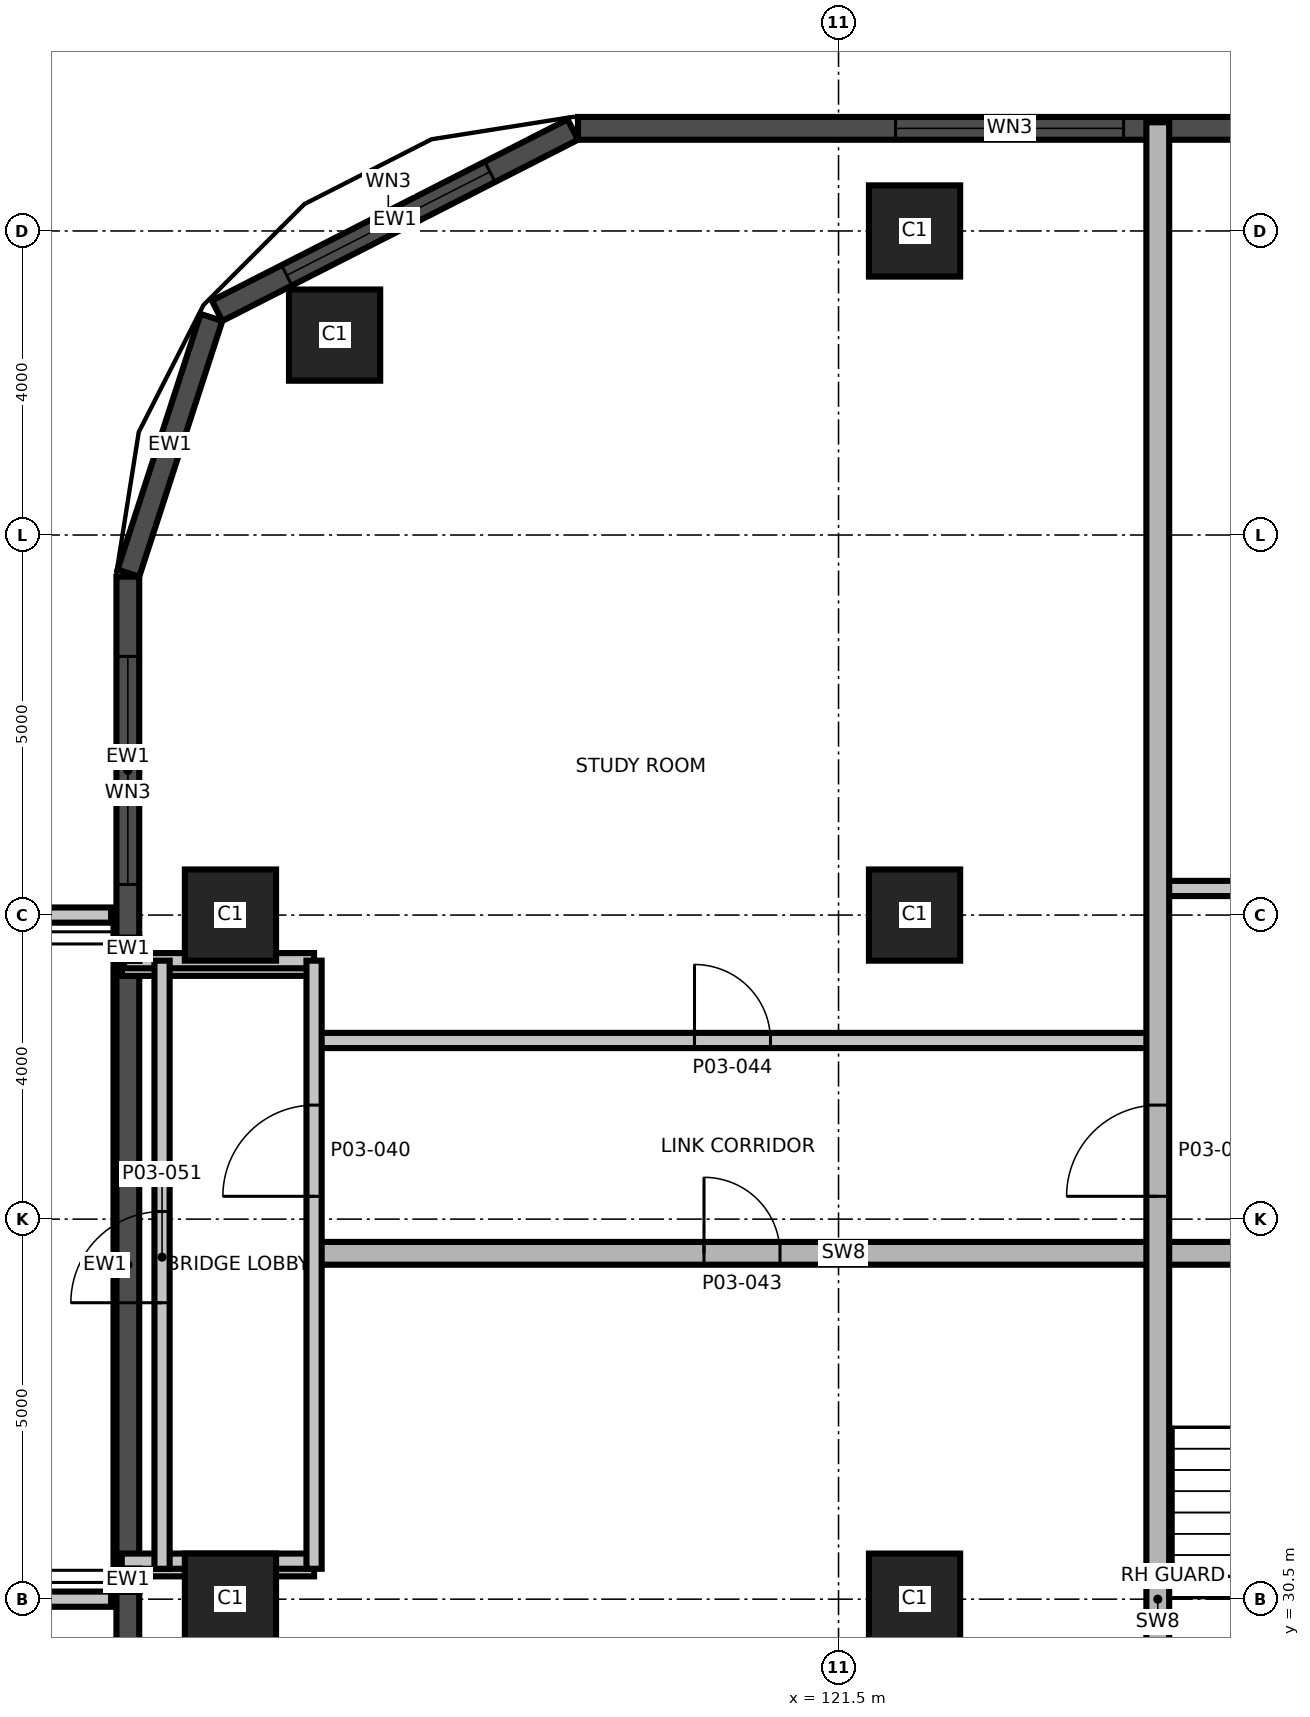
"""IFC4 building model, lengths in metres.
Left out: names, types, materials, properties, quantities, classifications, styles, units other than length and angle.
Written with IfcOpenShell. Run it as: python <this file> out.ifc"""

import sys

from ifc_helpers import new_model, si_unit, direction, frame, frame_2d, origin, origin_2d, place, context, subcontext, project, spatial, rectangle, extrude, element, fill, save


model = new_model("IFC4")
c1 = context("Model", 3, precision=1e-05, world=origin(), true_north=direction((0.0, 1.0)))
c2 = subcontext(c1, "Body", "Model", "MODEL_VIEW")
j1 = project(units=[si_unit("LENGTHUNIT", "METRE"), si_unit("PLANEANGLEUNIT", "RADIAN")], contexts=[c1])
p1 = place(None, origin())
s1 = spatial("IfcSite", under=j1, at=p1, CompositionType="ELEMENT")
p2 = place(p1, origin())
s2 = spatial("IfcBuilding", under=s1, at=p2, CompositionType="ELEMENT")
p3 = place(p2, frame((0.0, 0.0, 18.5)))
s3 = spatial("IfcBuildingStorey", under=s2, at=p3, CompositionType="ELEMENT", Elevation=18.5)
for number, where, z_axis, x_axis in (
    (1, (113.5, 30.5, 0.0), (0.0, 0.0, 1.0), (1.0, 0.0, 0.0)),
    (2, (122.5, 30.5, 0.0), (0.0, 0.0, 1.0), (1.0, 0.0, 0.0)),
    (3, (113.5, 39.5, 0.0), (0.0, 0.0, 1.0), (1.0, 0.0, 0.0)),
    (4, (122.5, 39.5, 0.0), (0.0, 0.0, 1.0), (1.0, 0.0, 0.0)),
    (5, (114.87, 47.13, 0.0), (0.0, 0.0, 1.0), (1.0, 0.0, 0.0)),
    (6, (122.5, 48.5, 0.0), (0.0, 0.0, 1.0), (1.0, 0.0, 0.0)),
):
    element("IfcColumn", number, at=place(p3, frame(where, z_axis=z_axis, x_axis=x_axis)), inside=s3, PredefinedType="COLUMN", context=c2, shape_type="SweptSolid", body=[
        extrude(rectangle(XDim=1.2, YDim=1.2, at=origin_2d()), origin(), (0.0, 0.0, 1.0), 5.0),
    ])
p4 = place(p3, frame((153.952, 49.85, 0.0), z_axis=(0.0, 0.0, 1.0), x_axis=(-1.0, 0.0, 0.0)))
e7 = element("IfcWall", 7, at=p4, inside=s3, PredefinedType="SOLIDWALL", context=c2, shape_type="SweptSolid", body=[
    extrude(rectangle(XDim=35.88, YDim=0.3, at=frame_2d((17.94, 0.0))), origin(), (0.0, 0.0, 1.0), 4.7),
])
p5 = place(p4, frame((1.226, 0.0, 0.9)))
e8 = element("IfcOpeningElement", 8, at=p5, cuts=e7, PredefinedType="OPENING", context=c2, shape_type="SweptSolid", body=[
    extrude(rectangle(XDim=3.0, YDim=2.4, at=frame_2d((1.5, 1.2))), frame((0.0, 0.16, 0.0), z_axis=(0.0, -1.0, 0.0), x_axis=(1.0, 0.0, 0.0)), (0.0, 0.0, 1.0), 0.32),
])
p6 = place(p4, frame((15.202, 0.0, 0.9)))
e9 = element("IfcOpeningElement", 9, at=p6, cuts=e7, PredefinedType="OPENING", context=c2, shape_type="SweptSolid", body=[
    extrude(rectangle(XDim=3.0, YDim=2.4, at=frame_2d((1.5, 1.2))), frame((0.0, 0.16, 0.0), z_axis=(0.0, -1.0, 0.0), x_axis=(1.0, 0.0, 0.0)), (0.0, 0.0, 1.0), 0.32),
])
p7 = place(p4, frame((24.202, 0.0, 0.9)))
e10 = element("IfcOpeningElement", 10, at=p7, cuts=e7, PredefinedType="OPENING", context=c2, shape_type="SweptSolid", body=[
    extrude(rectangle(XDim=3.0, YDim=2.4, at=frame_2d((1.5, 1.2))), frame((0.0, 0.16, 0.0), z_axis=(0.0, -1.0, 0.0), x_axis=(1.0, 0.0, 0.0)), (0.0, 0.0, 1.0), 0.32),
])
p8 = place(p4, frame((28.702, 0.0, 0.9)))
e11 = element("IfcOpeningElement", 11, at=p8, cuts=e7, PredefinedType="OPENING", context=c2, shape_type="SweptSolid", body=[
    extrude(rectangle(XDim=3.0, YDim=2.4, at=frame_2d((1.5, 1.2))), frame((0.0, 0.16, 0.0), z_axis=(0.0, -1.0, 0.0), x_axis=(1.0, 0.0, 0.0)), (0.0, 0.0, 1.0), 0.32),
])
p9 = place(p3, frame((118.004, 49.834, 0.0), z_axis=(0.0, 0.0, 1.0), x_axis=(-0.890998339455, -0.454006562826, 0.0)))
e12 = element("IfcWall", 12, at=p9, inside=s3, PredefinedType="SOLIDWALL", context=c2, shape_type="SweptSolid", body=[
    extrude(rectangle(XDim=5.252, YDim=0.3, at=frame_2d((2.626, 0.0))), origin(), (0.0, 0.0, 1.0), 4.7),
])
p10 = place(p9, frame((1.224, 0.0, 0.9)))
e13 = element("IfcOpeningElement", 13, at=p10, cuts=e12, PredefinedType="OPENING", context=c2, shape_type="SweptSolid", body=[
    extrude(rectangle(XDim=3.0, YDim=2.4, at=frame_2d((1.5, 1.2))), frame((0.0, 0.16, 0.0), z_axis=(0.0, -1.0, 0.0), x_axis=(1.0, 0.0, 0.0)), (0.0, 0.0, 1.0), 0.32),
])
p11 = place(p3, frame((113.25, 47.362, 0.0), z_axis=(0.0, 0.0, 1.0), x_axis=(-0.309073584194, -0.951038127287, 0.0)))
e14 = element("IfcWall", 14, at=p11, inside=s3, PredefinedType="SOLIDWALL", context=c2, shape_type="SweptSolid", body=[
    extrude(rectangle(XDim=3.536, YDim=0.3, at=frame_2d((1.768, 0.0))), origin(), (0.0, 0.0, 1.0), 4.7),
])
p12 = place(p3, frame((112.15, 38.9, 3.15), z_axis=(0.0, 0.0, 1.0), x_axis=(0.0, -1.0, 0.0)))
e15 = element("IfcWall", 15, at=p12, inside=s3, PredefinedType="SOLIDWALL", context=c2, shape_type="SweptSolid", body=[
    extrude(rectangle(XDim=8.0, YDim=0.3, at=frame_2d((4.0, 0.0))), origin(), (0.0, 0.0, 1.0), 1.55),
])
p13 = place(p3, frame((112.15, 43.952, 0.0), z_axis=(0.0, 0.0, 1.0), x_axis=(0.0, -1.0, 0.0)))
e16 = element("IfcWall", 16, at=p13, inside=s3, PredefinedType="SOLIDWALL", context=c2, shape_type="SweptSolid", body=[
    extrude(rectangle(XDim=4.752, YDim=0.3, at=frame_2d((2.376, 0.0))), origin(), (0.0, 0.0, 1.0), 4.7),
])
p14 = place(p13, frame((1.05, 0.0, 0.9)))
e17 = element("IfcOpeningElement", 17, at=p14, cuts=e16, PredefinedType="OPENING", context=c2, shape_type="SweptSolid", body=[
    extrude(rectangle(XDim=3.0, YDim=2.4, at=frame_2d((1.5, 1.2))), frame((0.0, 0.16, 0.0), z_axis=(0.0, -1.0, 0.0), x_axis=(1.0, 0.0, 0.0)), (0.0, 0.0, 1.0), 0.32),
])
p15 = place(p3, frame((112.15, 30.6, 0.0), z_axis=(0.0, 0.0, 1.0), x_axis=(0.0, -1.0, 0.0)))
e18 = element("IfcWall", 18, at=p15, inside=s3, PredefinedType="SOLIDWALL", context=c2, shape_type="SweptSolid", body=[
    extrude(rectangle(XDim=13.528, YDim=0.3, at=frame_2d((6.764, 0.0))), origin(), (0.0, 0.0, 1.0), 4.7),
])
p16 = place(p15, frame((0.676, 0.0, 0.9)))
e19 = element("IfcOpeningElement", 19, at=p16, cuts=e18, PredefinedType="OPENING", context=c2, shape_type="SweptSolid", body=[
    extrude(rectangle(XDim=3.0, YDim=2.4, at=frame_2d((1.5, 1.2))), frame((0.0, 0.16, 0.0), z_axis=(0.0, -1.0, 0.0), x_axis=(1.0, 0.0, 0.0)), (0.0, 0.0, 1.0), 0.32),
])
p17 = place(p15, frame((5.376, 0.0, 0.9)))
e20 = element("IfcOpeningElement", 20, at=p17, cuts=e18, PredefinedType="OPENING", context=c2, shape_type="SweptSolid", body=[
    extrude(rectangle(XDim=3.0, YDim=2.4, at=frame_2d((1.5, 1.2))), frame((0.0, 0.16, 0.0), z_axis=(0.0, -1.0, 0.0), x_axis=(1.0, 0.0, 0.0)), (0.0, 0.0, 1.0), 0.32),
])
p18 = place(p15, frame((9.876, 0.0, 0.9)))
e21 = element("IfcOpeningElement", 21, at=p18, cuts=e18, PredefinedType="OPENING", context=c2, shape_type="SweptSolid", body=[
    extrude(rectangle(XDim=3.0, YDim=2.4, at=frame_2d((1.5, 1.2))), frame((0.0, 0.16, 0.0), z_axis=(0.0, -1.0, 0.0), x_axis=(1.0, 0.0, 0.0)), (0.0, 0.0, 1.0), 0.32),
])
p19 = place(p3, frame((105.07, 30.5, 0.0), z_axis=(0.0, 0.0, 1.0), x_axis=(1.0, 0.0, 0.0)))
e22 = element("IfcWall", 22, at=p19, inside=s3, PredefinedType="PARTITIONING", context=c2, shape_type="SweptSolid", body=[
    extrude(rectangle(XDim=6.86, YDim=0.2, at=frame_2d((3.43, 0.0))), origin(), (0.0, 0.0, 1.0), 4.7),
])
p20 = place(p3, frame((112.1, 30.9, 0.0), z_axis=(0.0, 0.0, 1.0), x_axis=(1.0, 0.0, 0.0)))
e23 = element("IfcWall", 23, at=p20, inside=s3, PredefinedType="PARTITIONING", context=c2, shape_type="SweptSolid", body=[
    extrude(rectangle(XDim=2.5, YDim=0.2, at=frame_2d((1.25, 0.0))), origin(), (0.0, 0.0, 1.0), 2.7),
])
p21 = place(p3, frame((112.07, 31.0, 0.0), z_axis=(0.0, 0.0, 1.0), x_axis=(1.0, 0.0, 0.0)))
e24 = element("IfcWall", 24, at=p21, inside=s3, PredefinedType="PARTITIONING", context=c2, shape_type="SweptSolid", body=[
    extrude(rectangle(XDim=2.53, YDim=0.2, at=frame_2d((1.265, 0.0))), origin(), (0.0, 0.0, 1.0), 4.7),
])
p22 = place(p3, frame((114.6, 35.05, 0.0), z_axis=(0.0, 0.0, 1.0), x_axis=(1.0, 0.0, 0.0)))
e25 = element("IfcWall", 25, at=p22, inside=s3, PredefinedType="SHEAR", context=c2, shape_type="SweptSolid", body=[
    extrude(rectangle(XDim=13.93, YDim=0.3, at=frame_2d((6.965, 0.0))), origin(), (0.0, 0.0, 1.0), 4.7),
])
p23 = place(p22, frame((5.13, 0.0, 0.0)))
e26 = element("IfcOpeningElement", 26, at=p23, cuts=e25, PredefinedType="OPENING", context=c2, shape_type="SweptSolid", body=[
    extrude(rectangle(XDim=1.0, YDim=2.1, at=frame_2d((0.5, 1.05))), frame((0.0, 0.16, 0.0), z_axis=(0.0, -1.0, 0.0), x_axis=(1.0, 0.0, 0.0)), (0.0, 0.0, 1.0), 0.32),
])
p24 = place(p3, frame((114.6, 37.85, 0.0), z_axis=(0.0, 0.0, 1.0), x_axis=(1.0, 0.0, 0.0)))
e27 = element("IfcWall", 27, at=p24, inside=s3, PredefinedType="PARTITIONING", context=c2, shape_type="SweptSolid", body=[
    extrude(rectangle(XDim=11.15, YDim=0.2, at=frame_2d((5.575, 0.0))), origin(), (0.0, 0.0, 1.0), 4.7),
])
p25 = place(p24, frame((5.005, 0.0, 0.0)))
e28 = element("IfcOpeningElement", 28, at=p25, cuts=e27, PredefinedType="OPENING", context=c2, shape_type="SweptSolid", body=[
    extrude(rectangle(XDim=1.0, YDim=2.1, at=frame_2d((0.5, 1.05))), frame((0.0, 0.11, 0.0), z_axis=(0.0, -1.0, 0.0), x_axis=(1.0, 0.0, 0.0)), (0.0, 0.0, 1.0), 0.22),
])
p26 = place(p3, frame((112.07, 38.8, 0.0), z_axis=(0.0, 0.0, 1.0), x_axis=(1.0, 0.0, 0.0)))
e29 = element("IfcWall", 29, at=p26, inside=s3, PredefinedType="PARTITIONING", context=c2, shape_type="SweptSolid", body=[
    extrude(rectangle(XDim=2.53, YDim=0.2, at=frame_2d((1.265, 0.0))), origin(), (0.0, 0.0, 1.0), 4.7),
])
p27 = place(p3, frame((112.1, 38.9, 0.0), z_axis=(0.0, 0.0, 1.0), x_axis=(1.0, 0.0, 0.0)))
e30 = element("IfcWall", 30, at=p27, inside=s3, PredefinedType="PARTITIONING", context=c2, shape_type="SweptSolid", body=[
    extrude(rectangle(XDim=2.5, YDim=0.2, at=frame_2d((1.25, 0.0))), origin(), (0.0, 0.0, 1.0), 2.7),
])
p28 = place(p3, frame((105.07, 39.5, 0.0), z_axis=(0.0, 0.0, 1.0), x_axis=(1.0, 0.0, 0.0)))
e31 = element("IfcWall", 31, at=p28, inside=s3, PredefinedType="PARTITIONING", context=c2, shape_type="SweptSolid", body=[
    extrude(rectangle(XDim=6.86, YDim=0.2, at=frame_2d((3.43, 0.0))), origin(), (0.0, 0.0, 1.0), 4.7),
])
p29 = place(p3, frame((125.75, 39.85, 0.0), z_axis=(0.0, 0.0, 1.0), x_axis=(1.0, 0.0, 0.0)))
e32 = element("IfcWall", 32, at=p29, inside=s3, PredefinedType="PARTITIONING", context=c2, shape_type="SweptSolid", body=[
    extrude(rectangle(XDim=3.25, YDim=0.2, at=frame_2d((1.625, 0.0))), origin(), (0.0, 0.0, 1.0), 4.7),
])
p30 = place(p29, frame((2.002, 0.0, 0.0)))
e33 = element("IfcOpeningElement", 33, at=p30, cuts=e32, PredefinedType="OPENING", context=c2, shape_type="SweptSolid", body=[
    extrude(rectangle(XDim=1.0, YDim=2.1, at=frame_2d((0.5, 1.05))), frame((0.0, 0.11, 0.0), z_axis=(0.0, -1.0, 0.0), x_axis=(1.0, 0.0, 0.0)), (0.0, 0.0, 1.0), 0.22),
])
p31 = place(p3, frame((112.6, 30.9, 0.0), z_axis=(0.0, 0.0, 1.0), x_axis=(0.0, 1.0, 0.0)))
e34 = element("IfcWall", 34, at=p31, inside=s3, PredefinedType="PARTITIONING", context=c2, shape_type="SweptSolid", body=[
    extrude(rectangle(XDim=8.0, YDim=0.2, at=frame_2d((4.0, 0.0))), origin(), (0.0, 0.0, 1.0), 4.7),
])
p32 = place(p31, frame((3.5, 0.0, 0.0)))
e35 = element("IfcOpeningElement", 35, at=p32, cuts=e34, PredefinedType="OPENING", context=c2, shape_type="SweptSolid", body=[
    extrude(rectangle(XDim=1.2, YDim=2.1, at=frame_2d((0.6, 1.05))), frame((0.0, 0.11, 0.0), z_axis=(0.0, -1.0, 0.0), x_axis=(1.0, 0.0, 0.0)), (0.0, 0.0, 1.0), 0.22),
])
p33 = place(p3, frame((114.6, 30.9, 0.0), z_axis=(0.0, 0.0, 1.0), x_axis=(0.0, 1.0, 0.0)))
e36 = element("IfcWall", 36, at=p33, inside=s3, PredefinedType="PARTITIONING", context=c2, shape_type="SweptSolid", body=[
    extrude(rectangle(XDim=8.0, YDim=0.2, at=frame_2d((4.0, 0.0))), origin(), (0.0, 0.0, 1.0), 4.7),
])
p34 = place(p33, frame((4.9, 0.0, 0.0)))
e37 = element("IfcOpeningElement", 37, at=p34, cuts=e36, PredefinedType="OPENING", context=c2, shape_type="SweptSolid", body=[
    extrude(rectangle(XDim=1.2, YDim=2.1, at=frame_2d((0.6, 1.05))), frame((0.0, 0.11, 0.0), z_axis=(0.0, -1.0, 0.0), x_axis=(1.0, 0.0, 0.0)), (0.0, 0.0, 1.0), 0.22),
])
p35 = place(p3, frame((125.7, 11.07, 0.0), z_axis=(0.0, 0.0, 1.0), x_axis=(0.0, 1.0, 0.0)))
e38 = element("IfcWall", 38, at=p35, inside=s3, PredefinedType="SHEAR", context=c2, shape_type="SweptSolid", body=[
    extrude(rectangle(XDim=38.86, YDim=0.3, at=frame_2d((19.43, 0.0))), origin(), (0.0, 0.0, 1.0), 4.7),
])
p36 = place(p35, frame((24.73, 0.0, 0.0)))
e39 = element("IfcOpeningElement", 39, at=p36, cuts=e38, PredefinedType="OPENING", context=c2, shape_type="SweptSolid", body=[
    extrude(rectangle(XDim=1.2, YDim=2.1, at=frame_2d((0.6, 1.05))), frame((0.0, 0.16, 0.0), z_axis=(0.0, -1.0, 0.0), x_axis=(1.0, 0.0, 0.0)), (0.0, 0.0, 1.0), 0.32),
])
p37 = place(p3, frame((112.15, 39.2, 0.0), z_axis=(0.0, 0.0, 1.0), x_axis=(0.0, -1.0, 0.0)))
e40 = element("IfcWall", 40, at=p37, inside=s3, PredefinedType="SOLIDWALL", context=c2, shape_type="SweptSolid", body=[
    extrude(rectangle(XDim=0.3, YDim=0.3, at=frame_2d((0.15, 0.0))), origin(), (0.0, 0.0, 1.0), 2.7),
])
p38 = place(p3, frame((112.15, 39.2, 3.15), z_axis=(0.0, 0.0, 1.0), x_axis=(0.0, -1.0, 0.0)))
e41 = element("IfcWall", 41, at=p38, inside=s3, PredefinedType="SOLIDWALL", context=c2, shape_type="SweptSolid", body=[
    extrude(rectangle(XDim=0.3, YDim=0.3, at=frame_2d((0.15, 0.0))), origin(), (0.0, 0.0, 1.0), 1.55),
])
p39 = place(p3, frame((112.15, 30.6, 0.0), z_axis=(0.0, 0.0, 1.0), x_axis=(0.0, 1.0, 0.0)))
e42 = element("IfcWall", 42, at=p39, inside=s3, PredefinedType="SOLIDWALL", context=c2, shape_type="SweptSolid", body=[
    extrude(rectangle(XDim=0.3, YDim=0.3, at=frame_2d((0.15, 0.0))), origin(), (0.0, 0.0, 1.0), 2.7),
])
p40 = place(p3, frame((112.15, 30.6, 3.15), z_axis=(0.0, 0.0, 1.0), x_axis=(0.0, 1.0, 0.0)))
e43 = element("IfcWall", 43, at=p40, inside=s3, PredefinedType="SOLIDWALL", context=c2, shape_type="SweptSolid", body=[
    extrude(rectangle(XDim=0.3, YDim=0.3, at=frame_2d((0.15, 0.0))), origin(), (0.0, 0.0, 1.0), 1.55),
])
p41 = place(p8, origin())
e44 = element("IfcWindow", 44, at=p41, inside=s3, PartitioningType="SINGLE_PANEL", PredefinedType="WINDOW", context=c2, shape_type="SweptSolid", body=[
    extrude(rectangle(XDim=3.0, YDim=2.4, at=frame_2d((1.5, 1.2))), frame((0.0, 0.03, 0.0), z_axis=(0.0, -1.0, 0.0), x_axis=(1.0, 0.0, 0.0)), (0.0, 0.0, 1.0), 0.06),
])
fill(e11, e44)
p42 = place(p10, origin())
e45 = element("IfcWindow", 45, at=p42, inside=s3, PartitioningType="SINGLE_PANEL", PredefinedType="WINDOW", context=c2, shape_type="SweptSolid", body=[
    extrude(rectangle(XDim=3.0, YDim=2.4, at=frame_2d((1.5, 1.2))), frame((0.0, 0.03, 0.0), z_axis=(0.0, -1.0, 0.0), x_axis=(1.0, 0.0, 0.0)), (0.0, 0.0, 1.0), 0.06),
])
fill(e13, e45)
p43 = place(p14, origin())
e46 = element("IfcWindow", 46, at=p43, inside=s3, PartitioningType="SINGLE_PANEL", PredefinedType="WINDOW", context=c2, shape_type="SweptSolid", body=[
    extrude(rectangle(XDim=3.0, YDim=2.4, at=frame_2d((1.5, 1.2))), frame((0.0, 0.03, 0.0), z_axis=(0.0, -1.0, 0.0), x_axis=(1.0, 0.0, 0.0)), (0.0, 0.0, 1.0), 0.06),
])
fill(e17, e46)
p44 = place(p34, origin())
e47 = element("IfcDoor", 47, at=p44, inside=s3, OperationType="SINGLE_SWING_RIGHT", PredefinedType="DOOR", context=c2, shape_type="SweptSolid", body=[
    extrude(rectangle(XDim=1.2, YDim=2.1, at=frame_2d((0.6, 1.05))), frame((0.0, 0.025, 0.0), z_axis=(0.0, -1.0, 0.0), x_axis=(1.0, 0.0, 0.0)), (0.0, 0.0, 1.0), 0.05),
])
fill(e37, e47)
p45 = place(p36, origin())
e48 = element("IfcDoor", 48, at=p45, inside=s3, OperationType="SINGLE_SWING_LEFT", PredefinedType="DOOR", context=c2, shape_type="SweptSolid", body=[
    extrude(rectangle(XDim=1.2, YDim=2.1, at=frame_2d((0.6, 1.05))), frame((0.0, 0.025, 0.0), z_axis=(0.0, -1.0, 0.0), x_axis=(1.0, 0.0, 0.0)), (0.0, 0.0, 1.0), 0.05),
])
fill(e39, e48)
p46 = place(p23, origin())
e49 = element("IfcDoor", 49, at=p46, inside=s3, OperationType="SINGLE_SWING_LEFT", PredefinedType="DOOR", context=c2, shape_type="SweptSolid", body=[
    extrude(rectangle(XDim=1.0, YDim=2.1, at=frame_2d((0.5, 1.05))), frame((0.0, 0.025, 0.0), z_axis=(0.0, -1.0, 0.0), x_axis=(1.0, 0.0, 0.0)), (0.0, 0.0, 1.0), 0.05),
])
fill(e26, e49)
p47 = place(p25, origin())
e50 = element("IfcDoor", 50, at=p47, inside=s3, OperationType="SINGLE_SWING_RIGHT", PredefinedType="DOOR", context=c2, shape_type="SweptSolid", body=[
    extrude(rectangle(XDim=1.0, YDim=2.1, at=frame_2d((0.5, 1.05))), frame((0.0, 0.025, 0.0), z_axis=(0.0, -1.0, 0.0), x_axis=(1.0, 0.0, 0.0)), (0.0, 0.0, 1.0), 0.05),
])
fill(e28, e50)
p48 = place(p32, origin())
e51 = element("IfcDoor", 51, at=p48, inside=s3, OperationType="SINGLE_SWING_LEFT", PredefinedType="DOOR", context=c2, shape_type="SweptSolid", body=[
    extrude(rectangle(XDim=1.2, YDim=2.1, at=frame_2d((0.6, 1.05))), frame((0.0, 0.025, 0.0), z_axis=(0.0, -1.0, 0.0), x_axis=(1.0, 0.0, 0.0)), (0.0, 0.0, 1.0), 0.05),
])
fill(e35, e51)
save(model, sys.argv[1])
